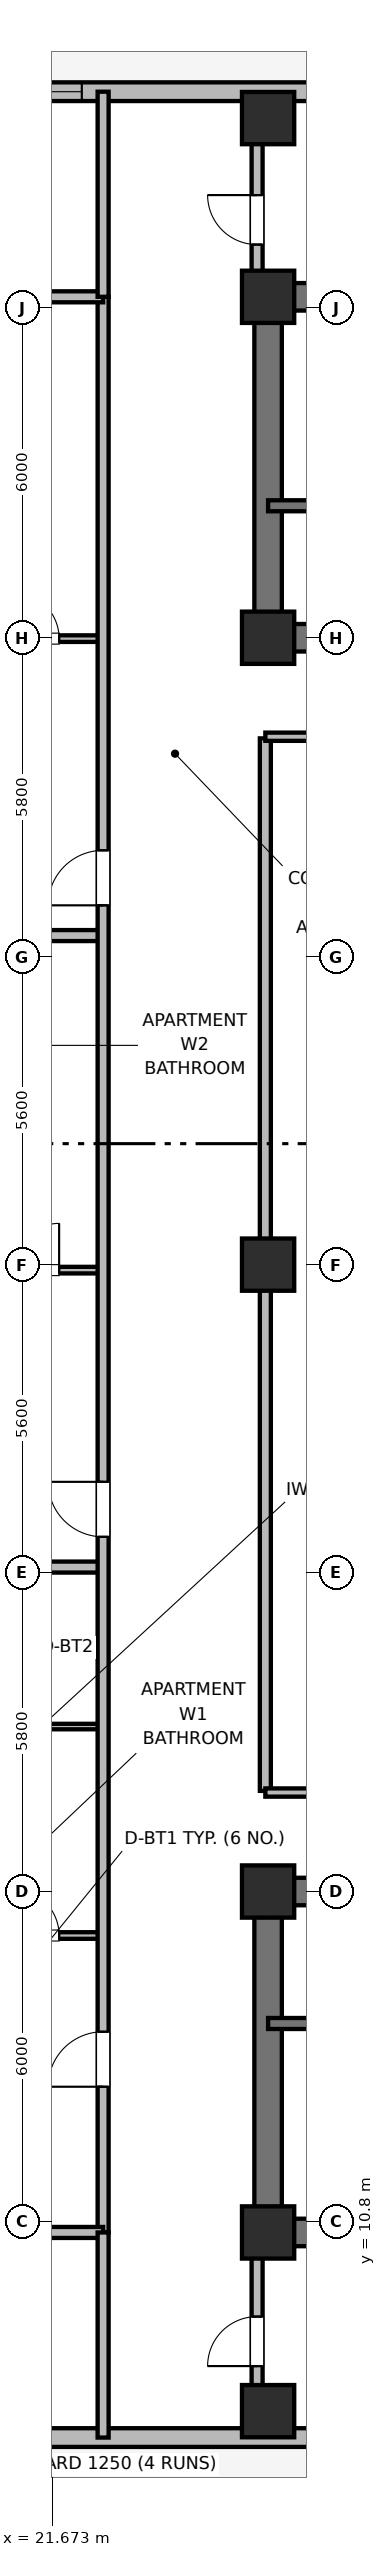
"""IFC4 building model, lengths in metres.
Left out: names, types, materials, properties, quantities, classifications, styles, units other than length and angle.
Written with IfcOpenShell. Run it as: python <this file> out.ifc"""

import sys

from ifc_helpers import new_model, si_unit, direction, frame, frame_2d, origin, origin_2d, place, context, subcontext, project, spatial, rectangle, extrude, element, fill, save


model = new_model("IFC4")
c1 = context("Model", 3, precision=1e-05, world=origin(), true_north=direction((0.0, 1.0)))
c2 = subcontext(c1, "Body", "Model", "MODEL_VIEW")
j1 = project(units=[si_unit("LENGTHUNIT", "METRE"), si_unit("PLANEANGLEUNIT", "RADIAN")], contexts=[c1])
p1 = place(None, origin())
s1 = spatial("IfcSite", under=j1, at=p1, CompositionType="ELEMENT")
p2 = place(p1, origin())
s2 = spatial("IfcBuilding", under=s1, at=p2, CompositionType="ELEMENT")
p3 = place(p2, frame((0.0, 0.0, 143.6)))
s3 = spatial("IfcBuildingStorey", under=s2, at=p3, CompositionType="ELEMENT", Elevation=143.6)
p4 = place(p3, frame((52.8, 10.6, 0.0), z_axis=(0.0, 0.0, 1.0), x_axis=(-1.0, 0.0, 0.0)))
e1 = element("IfcWall", 1, at=p4, inside=s3, PredefinedType="SHEAR", context=c2, shape_type="SweptSolid", body=[
    extrude(rectangle(XDim=27.2, YDim=0.5, at=frame_2d((13.6, 0.0))), origin(), (0.0, 0.0, 1.0), 4.2),
])
p5 = place(p3, frame((25.6, 10.85, 0.0), z_axis=(0.0, 0.0, 1.0), x_axis=(0.0, 1.0, 0.0)))
e2 = element("IfcWall", 2, at=p5, inside=s3, PredefinedType="SHEAR", context=c2, shape_type="SweptSolid", body=[
    extrude(rectangle(XDim=5.7, YDim=0.5, at=frame_2d((2.85, 0.0))), origin(), (0.0, 0.0, 1.0), 4.2),
])
p6 = place(p3, frame((25.6, 16.8, 0.0), z_axis=(0.0, 0.0, 1.0), x_axis=(1.0, 0.0, 0.0)))
e3 = element("IfcWall", 3, at=p6, inside=s3, PredefinedType="SHEAR", context=c2, shape_type="SweptSolid", body=[
    extrude(rectangle(XDim=27.2, YDim=0.5, at=frame_2d((13.6, 0.0))), origin(), (0.0, 0.0, 1.0), 4.2),
])
p7 = place(p6, frame((1.8, 0.0, 0.0)))
e4 = element("IfcOpeningElement", 4, at=p7, cuts=e3, PredefinedType="OPENING", context=c2, shape_type="SweptSolid", body=[
    extrude(rectangle(XDim=1.1, YDim=2.15, at=frame_2d((0.55, 1.075))), frame((0.0, 0.26, 0.0), z_axis=(0.0, -1.0, 0.0), x_axis=(1.0, 0.0, 0.0)), (0.0, 0.0, 1.0), 0.52),
])
p8 = place(p6, frame((5.6, 0.0, 0.0)))
e5 = element("IfcOpeningElement", 5, at=p8, cuts=e3, PredefinedType="OPENING", context=c2, shape_type="SweptSolid", body=[
    extrude(rectangle(XDim=0.85, YDim=2.1, at=frame_2d((0.425, 1.05))), frame((0.0, 0.26, 0.0), z_axis=(0.0, -1.0, 0.0), x_axis=(1.0, 0.0, 0.0)), (0.0, 0.0, 1.0), 0.52),
])
p9 = place(p6, frame((13.0, 0.0, 0.0)))
e6 = element("IfcOpeningElement", 6, at=p9, cuts=e3, PredefinedType="OPENING", context=c2, shape_type="SweptSolid", body=[
    extrude(rectangle(XDim=1.2, YDim=2.15, at=frame_2d((0.6, 1.075))), frame((0.0, 0.26, 0.0), z_axis=(0.0, -1.0, 0.0), x_axis=(1.0, 0.0, 0.0)), (0.0, 0.0, 1.0), 0.52),
])
p10 = place(p6, frame((19.2, 0.0, 0.0)))
e7 = element("IfcOpeningElement", 7, at=p10, cuts=e3, PredefinedType="OPENING", context=c2, shape_type="SweptSolid", body=[
    extrude(rectangle(XDim=0.85, YDim=2.1, at=frame_2d((0.425, 1.05))), frame((0.0, 0.26, 0.0), z_axis=(0.0, -1.0, 0.0), x_axis=(1.0, 0.0, 0.0)), (0.0, 0.0, 1.0), 0.52),
])
p11 = place(p6, frame((23.8, 0.0, 0.0)))
e8 = element("IfcOpeningElement", 8, at=p11, cuts=e3, PredefinedType="OPENING", context=c2, shape_type="SweptSolid", body=[
    extrude(rectangle(XDim=0.9, YDim=2.1, at=frame_2d((0.45, 1.05))), frame((0.0, 0.26, 0.0), z_axis=(0.0, -1.0, 0.0), x_axis=(1.0, 0.0, 0.0)), (0.0, 0.0, 1.0), 0.52),
])
p12 = place(p3, frame((25.6, 45.8, 0.0), z_axis=(0.0, 0.0, 1.0), x_axis=(1.0, 0.0, 0.0)))
e9 = element("IfcWall", 9, at=p12, inside=s3, PredefinedType="SHEAR", context=c2, shape_type="SweptSolid", body=[
    extrude(rectangle(XDim=27.2, YDim=0.5, at=frame_2d((13.6, 0.0))), origin(), (0.0, 0.0, 1.0), 4.2),
])
p13 = place(p3, frame((25.6, 39.85, 0.0), z_axis=(0.0, 0.0, 1.0), x_axis=(0.0, 1.0, 0.0)))
e10 = element("IfcWall", 10, at=p13, inside=s3, PredefinedType="SHEAR", context=c2, shape_type="SweptSolid", body=[
    extrude(rectangle(XDim=5.7, YDim=0.5, at=frame_2d((2.85, 0.0))), origin(), (0.0, 0.0, 1.0), 4.2),
])
p14 = place(p3, frame((52.8, 39.6, 0.0), z_axis=(0.0, 0.0, 1.0), x_axis=(-1.0, 0.0, 0.0)))
e11 = element("IfcWall", 11, at=p14, inside=s3, PredefinedType="SHEAR", context=c2, shape_type="SweptSolid", body=[
    extrude(rectangle(XDim=27.2, YDim=0.5, at=frame_2d((13.6, 0.0))), origin(), (0.0, 0.0, 1.0), 4.2),
])
p15 = place(p14, frame((24.2, 0.0, 0.0)))
e12 = element("IfcOpeningElement", 12, at=p15, cuts=e11, PredefinedType="OPENING", context=c2, shape_type="SweptSolid", body=[
    extrude(rectangle(XDim=1.1, YDim=2.15, at=frame_2d((0.55, 1.075))), frame((0.0, 0.26, 0.0), z_axis=(0.0, -1.0, 0.0), x_axis=(1.0, 0.0, 0.0)), (0.0, 0.0, 1.0), 0.52),
])
p16 = place(p14, frame((20.55, 0.0, 0.0)))
e13 = element("IfcOpeningElement", 13, at=p16, cuts=e11, PredefinedType="OPENING", context=c2, shape_type="SweptSolid", body=[
    extrude(rectangle(XDim=0.95, YDim=2.1, at=frame_2d((0.475, 1.05))), frame((0.0, 0.26, 0.0), z_axis=(0.0, -1.0, 0.0), x_axis=(1.0, 0.0, 0.0)), (0.0, 0.0, 1.0), 0.52),
])
p17 = place(p14, frame((15.1, 0.0, 0.0)))
e14 = element("IfcOpeningElement", 14, at=p17, cuts=e11, PredefinedType="OPENING", context=c2, shape_type="SweptSolid", body=[
    extrude(rectangle(XDim=1.2, YDim=2.15, at=frame_2d((0.6, 1.075))), frame((0.0, 0.26, 0.0), z_axis=(0.0, -1.0, 0.0), x_axis=(1.0, 0.0, 0.0)), (0.0, 0.0, 1.0), 0.52),
])
p18 = place(p14, frame((11.3, 0.0, 0.0)))
e15 = element("IfcOpeningElement", 15, at=p18, cuts=e11, PredefinedType="OPENING", context=c2, shape_type="SweptSolid", body=[
    extrude(rectangle(XDim=1.3, YDim=2.2, at=frame_2d((0.65, 1.1))), frame((0.0, 0.26, 0.0), z_axis=(0.0, -1.0, 0.0), x_axis=(1.0, 0.0, 0.0)), (0.0, 0.0, 1.0), 0.52),
])
p19 = place(p14, frame((4.2, 0.0, 0.0)))
e16 = element("IfcOpeningElement", 16, at=p19, cuts=e11, PredefinedType="OPENING", context=c2, shape_type="SweptSolid", body=[
    extrude(rectangle(XDim=1.3, YDim=2.2, at=frame_2d((0.65, 1.1))), frame((0.0, 0.26, 0.0), z_axis=(0.0, -1.0, 0.0), x_axis=(1.0, 0.0, 0.0)), (0.0, 0.0, 1.0), 0.52),
])
for number, where, z_axis, x_axis in (
    (17, (25.6, 10.6, 0.0), (0.0, 0.0, 1.0), (1.0, 0.0, 0.0)),
    (18, (25.6, 16.8, 0.0), (0.0, 0.0, 1.0), (1.0, 0.0, 0.0)),
    (19, (25.6, 39.6, 0.0), (0.0, 0.0, 1.0), (1.0, 0.0, 0.0)),
    (20, (25.6, 45.8, 0.0), (0.0, 0.0, 1.0), (1.0, 0.0, 0.0)),
    (21, (25.6, 28.2, 0.0), (0.0, 0.0, 1.0), (1.0, 0.0, 0.0)),
    (22, (25.6, 7.35, 0.0), (0.0, 0.0, 1.0), (1.0, 0.0, 0.0)),
    (23, (25.6, 49.05, 0.0), (0.0, 0.0, 1.0), (1.0, 0.0, 0.0)),
):
    element("IfcColumn", number, at=place(p3, frame(where, z_axis=z_axis, x_axis=x_axis)), inside=s3, PredefinedType="COLUMN", context=c2, shape_type="SweptSolid", body=[
        extrude(rectangle(XDim=0.95, YDim=0.95, at=origin_2d()), origin(), (0.0, 0.0, 1.0), 4.2),
    ])
p20 = place(p3, frame((20.2, 6.87, 0.0), z_axis=(0.0, 0.0, 1.0), x_axis=(1.0, 0.0, 0.0)))
e24 = element("IfcWall", 24, at=p20, inside=s3, PredefinedType="SOLIDWALL", context=c2, shape_type="SweptSolid", body=[
    extrude(rectangle(XDim=15.8, YDim=0.34, at=frame_2d((7.9, 0.0))), origin(), (0.0, 0.0, 1.0), 3.22),
])
p21 = place(p20, frame((8.113, 0.0, 0.85)))
e25 = element("IfcOpeningElement", 25, at=p21, cuts=e24, PredefinedType="OPENING", context=c2, shape_type="SweptSolid", body=[
    extrude(rectangle(XDim=1.8, YDim=1.85, at=frame_2d((0.9, 0.925))), frame((0.0, 0.18, 0.0), z_axis=(0.0, -1.0, 0.0), x_axis=(1.0, 0.0, 0.0)), (0.0, 0.0, 1.0), 0.36),
])
p22 = place(p20, frame((11.738, 0.0, 0.85)))
e26 = element("IfcOpeningElement", 26, at=p22, cuts=e24, PredefinedType="OPENING", context=c2, shape_type="SweptSolid", body=[
    extrude(rectangle(XDim=1.8, YDim=1.85, at=frame_2d((0.9, 0.925))), frame((0.0, 0.18, 0.0), z_axis=(0.0, -1.0, 0.0), x_axis=(1.0, 0.0, 0.0)), (0.0, 0.0, 1.0), 0.36),
])
p23 = place(p3, frame((27.55, 49.53, 0.0), z_axis=(0.0, 0.0, 1.0), x_axis=(-1.0, 0.0, 0.0)))
e27 = element("IfcWall", 27, at=p23, inside=s3, PredefinedType="SOLIDWALL", context=c2, shape_type="SweptSolid", body=[
    extrude(rectangle(XDim=7.35, YDim=0.34, at=frame_2d((3.675, 0.0))), origin(), (0.0, 0.0, 1.0), 3.22),
])
p24 = place(p23, frame((5.337, 0.0, 0.95)))
e28 = element("IfcOpeningElement", 28, at=p24, cuts=e27, PredefinedType="OPENING", context=c2, shape_type="SweptSolid", body=[
    extrude(rectangle(XDim=1.1, YDim=1.65, at=frame_2d((0.55, 0.825))), frame((0.0, 0.18, 0.0), z_axis=(0.0, -1.0, 0.0), x_axis=(1.0, 0.0, 0.0)), (0.0, 0.0, 1.0), 0.36),
])
p25 = place(p3, frame((25.6, 14.4, 0.0), z_axis=(0.0, 0.0, 1.0), x_axis=(1.0, 0.0, 0.0)))
e29 = element("IfcWall", 29, at=p25, inside=s3, PredefinedType="SHEAR", context=c2, shape_type="SweptSolid", body=[
    extrude(rectangle(XDim=9.55, YDim=0.2, at=frame_2d((4.775, 0.0))), origin(), (0.0, 0.0, 1.0), 4.2),
])
p26 = place(p25, frame((1.05, 0.0, 0.0)))
e30 = element("IfcOpeningElement", 30, at=p26, cuts=e29, PredefinedType="OPENING", context=c2, shape_type="SweptSolid", body=[
    extrude(rectangle(XDim=1.1, YDim=2.15, at=frame_2d((0.55, 1.075))), frame((0.0, 0.11, 0.0), z_axis=(0.0, -1.0, 0.0), x_axis=(1.0, 0.0, 0.0)), (0.0, 0.0, 1.0), 0.22),
])
p27 = place(p3, frame((35.15, 42.0, 0.0), z_axis=(0.0, 0.0, 1.0), x_axis=(-1.0, 0.0, 0.0)))
e31 = element("IfcWall", 31, at=p27, inside=s3, PredefinedType="SHEAR", context=c2, shape_type="SweptSolid", body=[
    extrude(rectangle(XDim=9.55, YDim=0.2, at=frame_2d((4.775, 0.0))), origin(), (0.0, 0.0, 1.0), 4.2),
])
p28 = place(p27, frame((7.25, 0.0, 0.0)))
e32 = element("IfcOpeningElement", 32, at=p28, cuts=e31, PredefinedType="OPENING", context=c2, shape_type="SweptSolid", body=[
    extrude(rectangle(XDim=1.1, YDim=2.15, at=frame_2d((0.55, 1.075))), frame((0.0, 0.11, 0.0), z_axis=(0.0, -1.0, 0.0), x_axis=(1.0, 0.0, 0.0)), (0.0, 0.0, 1.0), 0.22),
])
p29 = place(p3, frame((25.55, 18.63, 0.0), z_axis=(0.0, 0.0, 1.0), x_axis=(0.0, 1.0, 0.0)))
e33 = element("IfcWall", 33, at=p29, inside=s3, PredefinedType="PARTITIONING", context=c2, shape_type="SweptSolid", body=[
    extrude(rectangle(XDim=19.14, YDim=0.2, at=frame_2d((9.57, 0.0))), origin(), (0.0, 0.0, 1.0), 3.05),
])
for number, where, z_axis, x_axis in (
    (34, (25.55, 18.6, 0.0), (0.0, 0.0, 1.0), (1.0, 0.0, 0.0)),
    (35, (25.55, 37.8, 0.0), (0.0, 0.0, 1.0), (1.0, 0.0, 0.0)),
):
    element("IfcWall", number, at=place(p3, frame(where, z_axis=z_axis, x_axis=x_axis)), inside=s3, PredefinedType="PARTITIONING", context=c2, shape_type="SweptSolid", body=[
        extrude(rectangle(XDim=6.5, YDim=0.15, at=frame_2d((3.25, 0.0))), origin(), (0.0, 0.0, 1.0), 3.05),
    ])
p30 = place(p3, frame((20.35, 16.0, 0.0), z_axis=(0.0, 0.0, 1.0), x_axis=(1.0, 0.0, 0.0)))
e36 = element("IfcWall", 36, at=p30, inside=s3, PredefinedType="PARTITIONING", context=c2, shape_type="SweptSolid", body=[
    extrude(rectangle(XDim=2.25, YDim=0.12, at=frame_2d((1.125, 0.0))), origin(), (0.0, 0.0, 1.0), 3.05),
])
p31 = place(p30, frame((0.6, 0.0, 0.0)))
e37 = element("IfcOpeningElement", 37, at=p31, cuts=e36, PredefinedType="OPENING", context=c2, shape_type="SweptSolid", body=[
    extrude(rectangle(XDim=0.85, YDim=2.1, at=frame_2d((0.425, 1.05))), frame((0.0, 0.07, 0.0), z_axis=(0.0, -1.0, 0.0), x_axis=(1.0, 0.0, 0.0)), (0.0, 0.0, 1.0), 0.14),
])
p32 = place(p3, frame((20.35, 19.8, 0.0), z_axis=(0.0, 0.0, 1.0), x_axis=(1.0, 0.0, 0.0)))
e38 = element("IfcWall", 38, at=p32, inside=s3, PredefinedType="PARTITIONING", context=c2, shape_type="SweptSolid", body=[
    extrude(rectangle(XDim=2.25, YDim=0.1, at=frame_2d((1.125, 0.0))), origin(), (0.0, 0.0, 1.0), 3.05),
])
p33 = place(p3, frame((16.57, 22.7, 0.0), z_axis=(0.0, 0.0, 1.0), x_axis=(1.0, 0.0, 0.0)))
e39 = element("IfcWall", 39, at=p33, inside=s3, PredefinedType="PARTITIONING", context=c2, shape_type="SweptSolid", body=[
    extrude(rectangle(XDim=6.03, YDim=0.2, at=frame_2d((3.015, 0.0))), origin(), (0.0, 0.0, 1.0), 3.05),
])
p34 = place(p3, frame((20.35, 28.1, 0.0), z_axis=(0.0, 0.0, 1.0), x_axis=(1.0, 0.0, 0.0)))
e40 = element("IfcWall", 40, at=p34, inside=s3, PredefinedType="PARTITIONING", context=c2, shape_type="SweptSolid", body=[
    extrude(rectangle(XDim=2.25, YDim=0.12, at=frame_2d((1.125, 0.0))), origin(), (0.0, 0.0, 1.0), 3.05),
])
p35 = place(p34, frame((0.6, 0.0, 0.0)))
e41 = element("IfcOpeningElement", 41, at=p35, cuts=e40, PredefinedType="OPENING", context=c2, shape_type="SweptSolid", body=[
    extrude(rectangle(XDim=0.85, YDim=2.1, at=frame_2d((0.425, 1.05))), frame((0.0, 0.07, 0.0), z_axis=(0.0, -1.0, 0.0), x_axis=(1.0, 0.0, 0.0)), (0.0, 0.0, 1.0), 0.14),
])
p36 = place(p3, frame((16.57, 34.184, 0.0), z_axis=(0.0, 0.0, 1.0), x_axis=(1.0, 0.0, 0.0)))
e42 = element("IfcWall", 42, at=p36, inside=s3, PredefinedType="PARTITIONING", context=c2, shape_type="SweptSolid", body=[
    extrude(rectangle(XDim=6.03, YDim=0.2, at=frame_2d((3.015, 0.0))), origin(), (0.0, 0.0, 1.0), 3.05),
])
p37 = place(p3, frame((20.35, 39.584, 0.0), z_axis=(0.0, 0.0, 1.0), x_axis=(1.0, 0.0, 0.0)))
e43 = element("IfcWall", 43, at=p37, inside=s3, PredefinedType="PARTITIONING", context=c2, shape_type="SweptSolid", body=[
    extrude(rectangle(XDim=2.25, YDim=0.12, at=frame_2d((1.125, 0.0))), origin(), (0.0, 0.0, 1.0), 3.05),
])
p38 = place(p37, frame((0.6, 0.0, 0.0)))
e44 = element("IfcOpeningElement", 44, at=p38, cuts=e43, PredefinedType="OPENING", context=c2, shape_type="SweptSolid", body=[
    extrude(rectangle(XDim=0.85, YDim=2.1, at=frame_2d((0.425, 1.05))), frame((0.0, 0.07, 0.0), z_axis=(0.0, -1.0, 0.0), x_axis=(1.0, 0.0, 0.0)), (0.0, 0.0, 1.0), 0.14),
])
p39 = place(p3, frame((22.6, 10.6, 0.0), z_axis=(0.0, 0.0, 1.0), x_axis=(0.0, 1.0, 0.0)))
e45 = element("IfcWall", 45, at=p39, inside=s3, PredefinedType="PARTITIONING", context=c2, shape_type="SweptSolid", body=[
    extrude(rectangle(XDim=35.2, YDim=0.2, at=frame_2d((17.6, 0.0))), origin(), (0.0, 0.0, 1.0), 3.05),
])
p40 = place(p39, frame((2.65, 0.0, 0.0)))
e46 = element("IfcOpeningElement", 46, at=p40, cuts=e45, PredefinedType="OPENING", context=c2, shape_type="SweptSolid", body=[
    extrude(rectangle(XDim=1.0, YDim=2.15, at=frame_2d((0.5, 1.075))), frame((0.0, 0.11, 0.0), z_axis=(0.0, -1.0, 0.0), x_axis=(1.0, 0.0, 0.0)), (0.0, 0.0, 1.0), 0.22),
])
p41 = place(p39, frame((12.65, 0.0, 0.0)))
e47 = element("IfcOpeningElement", 47, at=p41, cuts=e45, PredefinedType="OPENING", context=c2, shape_type="SweptSolid", body=[
    extrude(rectangle(XDim=1.0, YDim=2.15, at=frame_2d((0.5, 1.075))), frame((0.0, 0.11, 0.0), z_axis=(0.0, -1.0, 0.0), x_axis=(1.0, 0.0, 0.0)), (0.0, 0.0, 1.0), 0.22),
])
p42 = place(p39, frame((24.134, 0.0, 0.0)))
e48 = element("IfcOpeningElement", 48, at=p42, cuts=e45, PredefinedType="OPENING", context=c2, shape_type="SweptSolid", body=[
    extrude(rectangle(XDim=1.0, YDim=2.15, at=frame_2d((0.5, 1.075))), frame((0.0, 0.11, 0.0), z_axis=(0.0, -1.0, 0.0), x_axis=(1.0, 0.0, 0.0)), (0.0, 0.0, 1.0), 0.22),
])
for number, where, z_axis, x_axis in (
    (49, (16.99, 10.6, 0.0), (0.0, 0.0, 1.0), (1.0, 0.0, 0.0)),
    (50, (16.99, 45.8, 0.0), (0.0, 0.0, 1.0), (1.0, 0.0, 0.0)),
):
    element("IfcWall", number, at=place(p3, frame(where, z_axis=z_axis, x_axis=x_axis)), inside=s3, PredefinedType="PARTITIONING", context=c2, shape_type="SweptSolid", body=[
        extrude(rectangle(XDim=5.61, YDim=0.2, at=frame_2d((2.805, 0.0))), origin(), (0.0, 0.0, 1.0), 3.05),
    ])
for number, where, z_axis, x_axis in (
    (51, (22.6, 6.87, 0.0), (0.0, 0.0, 1.0), (0.0, 1.0, 0.0)),
    (52, (22.6, 45.8, 0.0), (0.0, 0.0, 1.0), (0.0, 1.0, 0.0)),
):
    element("IfcWall", number, at=place(p3, frame(where, z_axis=z_axis, x_axis=x_axis)), inside=s3, PredefinedType="PARTITIONING", context=c2, shape_type="SweptSolid", body=[
        extrude(rectangle(XDim=3.73, YDim=0.2, at=frame_2d((1.865, 0.0))), origin(), (0.0, 0.0, 1.0), 3.05),
    ])
p43 = place(p3, frame((25.4, 7.52, 0.0), z_axis=(0.0, 0.0, 1.0), x_axis=(0.0, 1.0, 0.0)))
e53 = element("IfcWall", 53, at=p43, inside=s3, PredefinedType="PARTITIONING", context=c2, shape_type="SweptSolid", body=[
    extrude(rectangle(XDim=2.78, YDim=0.2, at=frame_2d((1.39, 0.0))), origin(), (0.0, 0.0, 1.0), 3.05),
])
p44 = place(p43, frame((0.65, 0.0, 0.0)))
e54 = element("IfcOpeningElement", 54, at=p44, cuts=e53, PredefinedType="OPENING", context=c2, shape_type="SweptSolid", body=[
    extrude(rectangle(XDim=0.9, YDim=2.1, at=frame_2d((0.45, 1.05))), frame((0.0, 0.11, 0.0), z_axis=(0.0, -1.0, 0.0), x_axis=(1.0, 0.0, 0.0)), (0.0, 0.0, 1.0), 0.22),
])
p45 = place(p3, frame((25.4, 46.1, 0.0), z_axis=(0.0, 0.0, 1.0), x_axis=(0.0, 1.0, 0.0)))
e55 = element("IfcWall", 55, at=p45, inside=s3, PredefinedType="PARTITIONING", context=c2, shape_type="SweptSolid", body=[
    extrude(rectangle(XDim=2.78, YDim=0.2, at=frame_2d((1.39, 0.0))), origin(), (0.0, 0.0, 1.0), 3.05),
])
p46 = place(p45, frame((0.65, 0.0, 0.0)))
e56 = element("IfcOpeningElement", 56, at=p46, cuts=e55, PredefinedType="OPENING", context=c2, shape_type="SweptSolid", body=[
    extrude(rectangle(XDim=0.9, YDim=2.1, at=frame_2d((0.45, 1.05))), frame((0.0, 0.11, 0.0), z_axis=(0.0, -1.0, 0.0), x_axis=(1.0, 0.0, 0.0)), (0.0, 0.0, 1.0), 0.22),
])
p47 = place(p24, origin())
e57 = element("IfcWindow", 57, at=p47, inside=s3, PartitioningType="SINGLE_PANEL", PredefinedType="WINDOW", context=c2, shape_type="SweptSolid", body=[
    extrude(rectangle(XDim=1.1, YDim=1.65, at=frame_2d((0.55, 0.825))), frame((0.0, 0.03, 0.0), z_axis=(0.0, -1.0, 0.0), x_axis=(1.0, 0.0, 0.0)), (0.0, 0.0, 1.0), 0.06),
])
fill(e28, e57)
p48 = place(p31, origin())
e58 = element("IfcDoor", 58, at=p48, inside=s3, OperationType="SINGLE_SWING_LEFT", PredefinedType="DOOR", context=c2, shape_type="SweptSolid", body=[
    extrude(rectangle(XDim=0.85, YDim=2.1, at=frame_2d((0.425, 1.05))), frame((0.0, 0.025, 0.0), z_axis=(0.0, -1.0, 0.0), x_axis=(1.0, 0.0, 0.0)), (0.0, 0.0, 1.0), 0.05),
])
fill(e37, e58)
p49 = place(p35, origin())
e59 = element("IfcDoor", 59, at=p49, inside=s3, OperationType="SINGLE_SWING_RIGHT", PredefinedType="DOOR", context=c2, shape_type="SweptSolid", body=[
    extrude(rectangle(XDim=0.85, YDim=2.1, at=frame_2d((0.425, 1.05))), frame((0.0, 0.025, 0.0), z_axis=(0.0, -1.0, 0.0), x_axis=(1.0, 0.0, 0.0)), (0.0, 0.0, 1.0), 0.05),
])
fill(e41, e59)
p50 = place(p38, origin())
e60 = element("IfcDoor", 60, at=p50, inside=s3, OperationType="SINGLE_SWING_LEFT", PredefinedType="DOOR", context=c2, shape_type="SweptSolid", body=[
    extrude(rectangle(XDim=0.85, YDim=2.1, at=frame_2d((0.425, 1.05))), frame((0.0, 0.025, 0.0), z_axis=(0.0, -1.0, 0.0), x_axis=(1.0, 0.0, 0.0)), (0.0, 0.0, 1.0), 0.05),
])
fill(e44, e60)
p51 = place(p40, origin())
e61 = element("IfcDoor", 61, at=p51, inside=s3, OperationType="SINGLE_SWING_LEFT", PredefinedType="DOOR", context=c2, shape_type="SweptSolid", body=[
    extrude(rectangle(XDim=1.0, YDim=2.15, at=frame_2d((0.5, 1.075))), frame((0.0, 0.025, 0.0), z_axis=(0.0, -1.0, 0.0), x_axis=(1.0, 0.0, 0.0)), (0.0, 0.0, 1.0), 0.05),
])
fill(e46, e61)
p52 = place(p41, origin())
e62 = element("IfcDoor", 62, at=p52, inside=s3, OperationType="SINGLE_SWING_RIGHT", PredefinedType="DOOR", context=c2, shape_type="SweptSolid", body=[
    extrude(rectangle(XDim=1.0, YDim=2.15, at=frame_2d((0.5, 1.075))), frame((0.0, 0.025, 0.0), z_axis=(0.0, -1.0, 0.0), x_axis=(1.0, 0.0, 0.0)), (0.0, 0.0, 1.0), 0.05),
])
fill(e47, e62)
p53 = place(p42, origin())
e63 = element("IfcDoor", 63, at=p53, inside=s3, OperationType="SINGLE_SWING_LEFT", PredefinedType="DOOR", context=c2, shape_type="SweptSolid", body=[
    extrude(rectangle(XDim=1.0, YDim=2.15, at=frame_2d((0.5, 1.075))), frame((0.0, 0.025, 0.0), z_axis=(0.0, -1.0, 0.0), x_axis=(1.0, 0.0, 0.0)), (0.0, 0.0, 1.0), 0.05),
])
fill(e48, e63)
p54 = place(p44, origin())
e64 = element("IfcDoor", 64, at=p54, inside=s3, OperationType="SINGLE_SWING_LEFT", PredefinedType="DOOR", context=c2, shape_type="SweptSolid", body=[
    extrude(rectangle(XDim=0.9, YDim=2.1, at=frame_2d((0.45, 1.05))), frame((0.0, 0.025, 0.0), z_axis=(0.0, -1.0, 0.0), x_axis=(1.0, 0.0, 0.0)), (0.0, 0.0, 1.0), 0.05),
])
fill(e54, e64)
p55 = place(p46, origin())
e65 = element("IfcDoor", 65, at=p55, inside=s3, OperationType="SINGLE_SWING_RIGHT", PredefinedType="DOOR", context=c2, shape_type="SweptSolid", body=[
    extrude(rectangle(XDim=0.9, YDim=2.1, at=frame_2d((0.45, 1.05))), frame((0.0, 0.025, 0.0), z_axis=(0.0, -1.0, 0.0), x_axis=(1.0, 0.0, 0.0)), (0.0, 0.0, 1.0), 0.05),
])
fill(e56, e65)
save(model, sys.argv[1])
